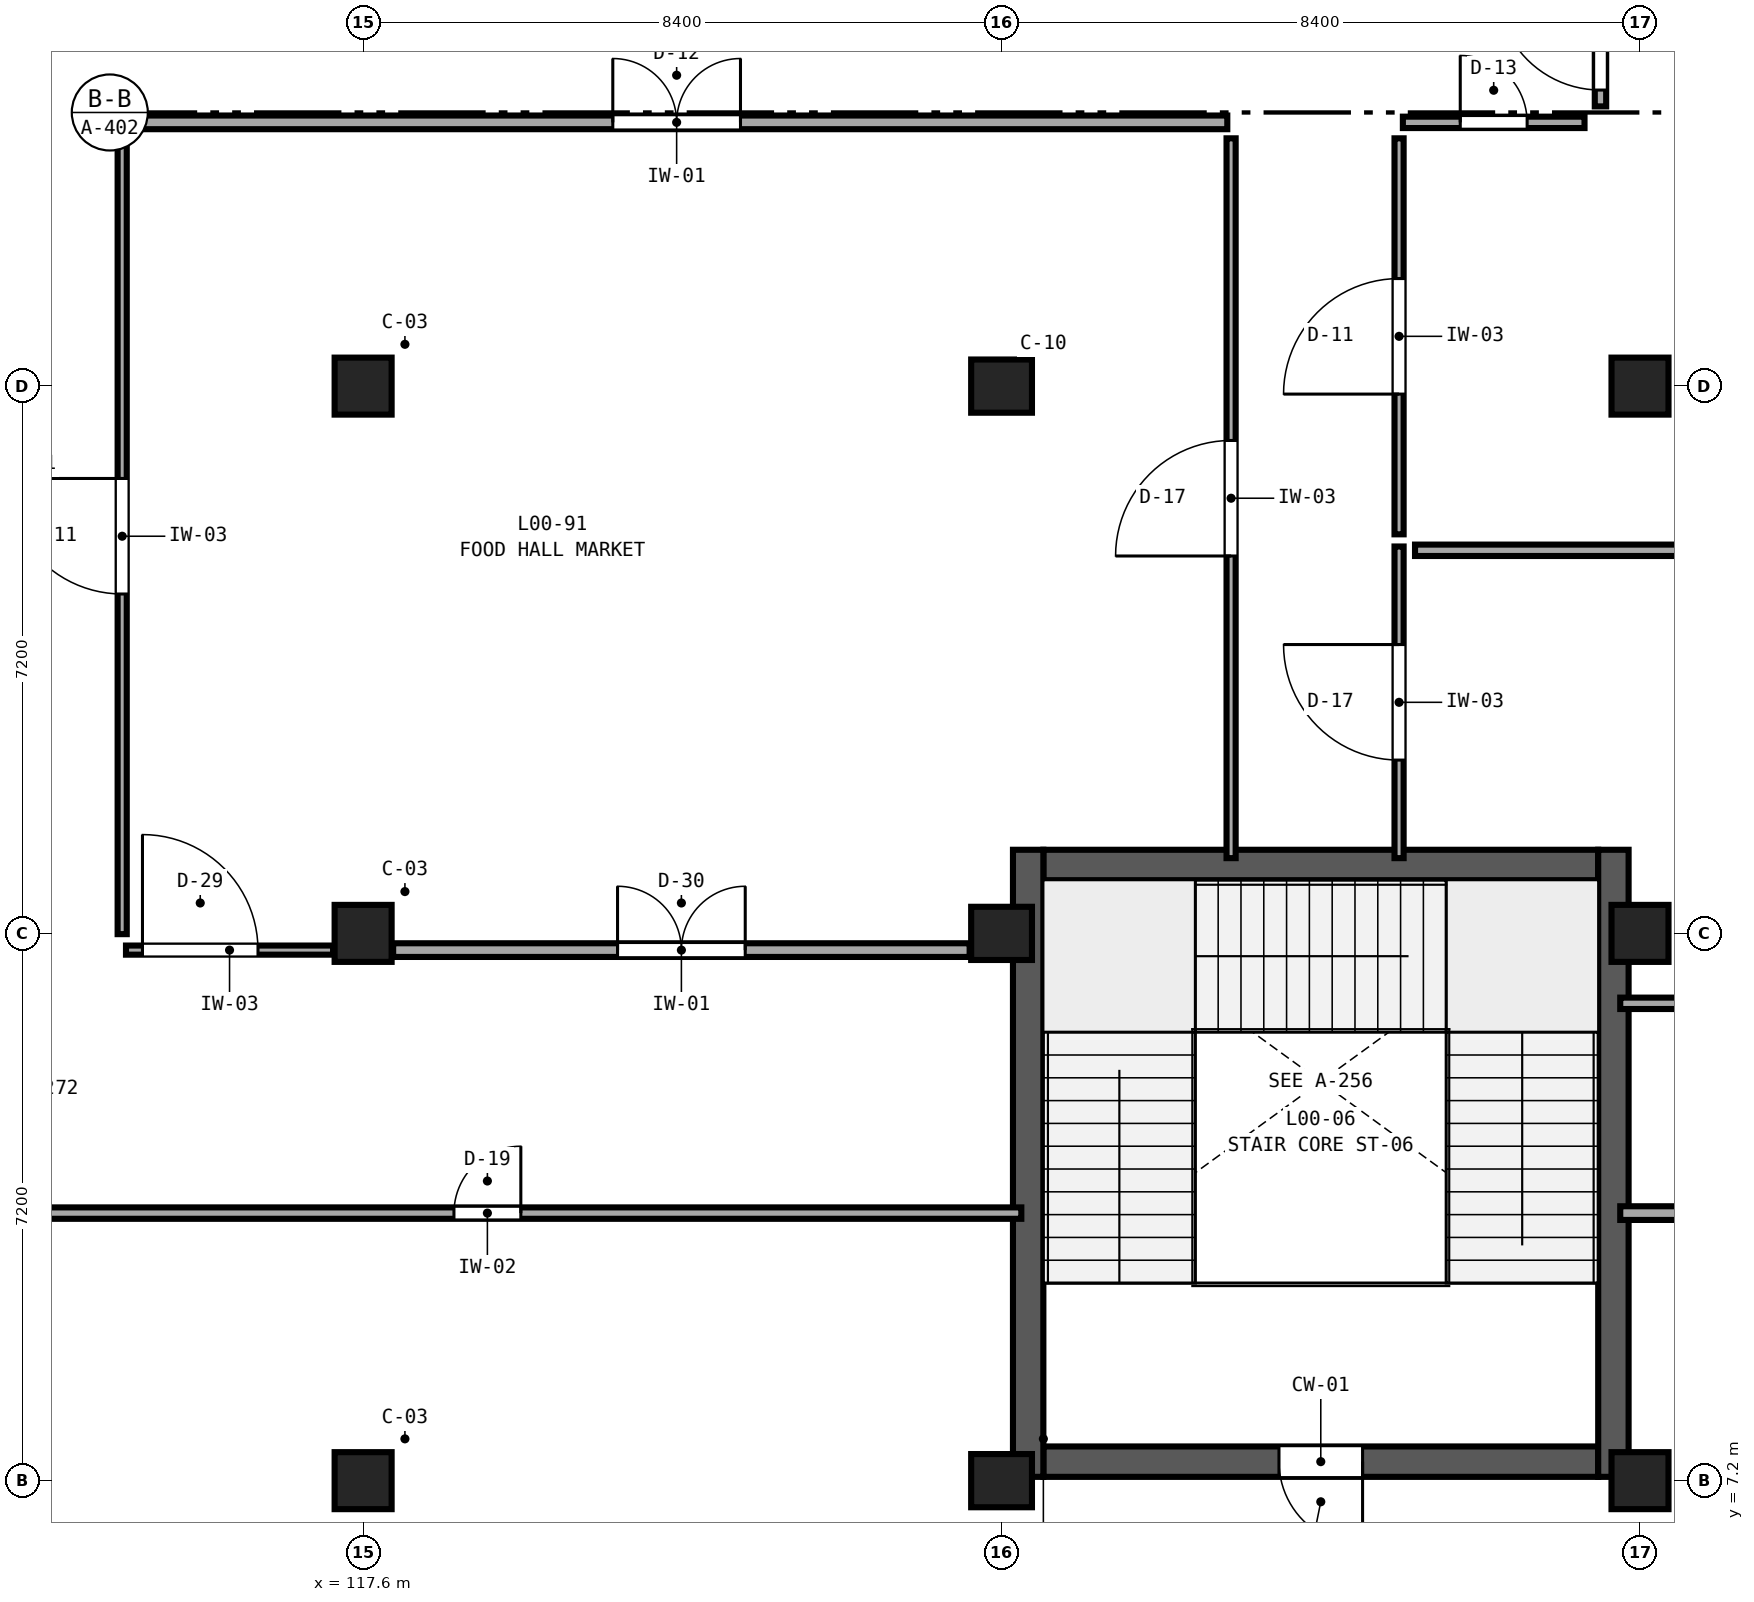
"""IFC4 building model, lengths in metres.
Left out: names, types, materials, properties, quantities, classifications, styles, units other than length and angle.
Written with IfcOpenShell. Run it as: python <this file> out.ifc"""

import sys

from ifc_helpers import new_model, si_unit, direction, frame, frame_2d, origin, origin_2d, place, context, subcontext, project, spatial, rectangle, extrude, element, fill, save


model = new_model("IFC4")
c1 = context("Model", 3, precision=1e-05, world=origin(), true_north=direction((0.0, 1.0)))
c2 = subcontext(c1, "Body", "Model", "MODEL_VIEW")
j1 = project(units=[si_unit("LENGTHUNIT", "METRE"), si_unit("PLANEANGLEUNIT", "RADIAN")], contexts=[c1])
p1 = place(None, origin())
s1 = spatial("IfcSite", under=j1, at=p1, CompositionType="ELEMENT")
p2 = place(p1, origin())
s2 = spatial("IfcBuilding", under=s1, at=p2, CompositionType="ELEMENT")
p3 = place(p2, origin())
s3 = spatial("IfcBuildingStorey", under=s2, at=p3, CompositionType="ELEMENT", Elevation=0.0)
for number, where, z_axis, x_axis in (
    (1, (117.6, 7.2, 0.0), (0.0, 0.0, 1.0), (1.0, 0.0, 0.0)),
    (2, (117.6, 14.4, 0.0), (0.0, 0.0, 1.0), (1.0, 0.0, 0.0)),
    (3, (117.6, 21.6, 0.0), (0.0, 0.0, 1.0), (1.0, 0.0, 0.0)),
):
    element("IfcColumn", number, at=place(p3, frame(where, z_axis=z_axis, x_axis=x_axis)), inside=s3, PredefinedType="COLUMN", context=c2, shape_type="SweptSolid", body=[
        extrude(rectangle(XDim=0.75, YDim=0.75, at=origin_2d()), origin(), (0.0, 0.0, 1.0), 5.4),
    ])
for number, where, z_axis, x_axis in (
    (4, (126.0, 7.2, 0.0), (0.0, 0.0, 1.0), (1.0, 0.0, 0.0)),
    (5, (126.0, 14.4, 0.0), (0.0, 0.0, 1.0), (1.0, 0.0, 0.0)),
    (6, (126.0, 21.6, 0.0), (0.0, 0.0, 1.0), (1.0, 0.0, 0.0)),
):
    element("IfcColumn", number, at=place(p3, frame(where, z_axis=z_axis, x_axis=x_axis)), inside=s3, PredefinedType="COLUMN", context=c2, shape_type="SweptSolid", body=[
        extrude(rectangle(XDim=0.8, YDim=0.7, at=origin_2d()), origin(), (0.0, 0.0, 1.0), 5.4),
    ])
for number, where, z_axis, x_axis in (
    (7, (134.4, 7.2, 0.0), (0.0, 0.0, 1.0), (1.0, 0.0, 0.0)),
    (8, (134.4, 14.4, 0.0), (0.0, 0.0, 1.0), (1.0, 0.0, 0.0)),
    (9, (134.4, 21.6, 0.0), (0.0, 0.0, 1.0), (1.0, 0.0, 0.0)),
):
    element("IfcColumn", number, at=place(p3, frame(where, z_axis=z_axis, x_axis=x_axis)), inside=s3, PredefinedType="COLUMN", context=c2, shape_type="SweptSolid", body=[
        extrude(rectangle(XDim=0.75, YDim=0.75, at=origin_2d()), origin(), (0.0, 0.0, 1.0), 5.4),
    ])
p4 = place(p3, frame((133.85, 7.45, 0.0), z_axis=(0.0, 0.0, 1.0), x_axis=(-1.0, 0.0, 0.0)))
e10 = element("IfcWall", 10, at=p4, inside=s3, PredefinedType="SHEAR", context=c2, shape_type="SweptSolid", body=[
    extrude(rectangle(XDim=7.3, YDim=0.4, at=frame_2d((3.65, 0.0))), origin(), (0.0, 0.0, 1.0), 5.4),
])
p5 = place(p4, frame((3.1, 0.0, 0.0)))
e11 = element("IfcOpeningElement", 11, at=p5, cuts=e10, PredefinedType="OPENING", context=c2, shape_type="SweptSolid", body=[
    extrude(rectangle(XDim=1.1, YDim=2.2, at=frame_2d((0.55, 1.1))), frame((0.0, 0.22, 0.0), z_axis=(0.0, -1.0, 0.0), x_axis=(1.0, 0.0, 0.0)), (0.0, 0.0, 1.0), 0.44),
])
p6 = place(p3, frame((126.55, 15.3, 0.0), z_axis=(0.0, 0.0, 1.0), x_axis=(1.0, 0.0, 0.0)))
e12 = element("IfcWall", 12, at=p6, inside=s3, PredefinedType="SHEAR", context=c2, shape_type="SweptSolid", body=[
    extrude(rectangle(XDim=7.3, YDim=0.4, at=frame_2d((3.65, 0.0))), origin(), (0.0, 0.0, 1.0), 5.4),
])
for number, where, z_axis, x_axis in (
    (13, (126.35, 15.5, 0.0), (0.0, 0.0, 1.0), (0.0, -1.0, 0.0)),
    (14, (134.05, 7.25, 0.0), (0.0, 0.0, 1.0), (0.0, 1.0, 0.0)),
):
    element("IfcWall", number, at=place(p3, frame(where, z_axis=z_axis, x_axis=x_axis)), inside=s3, PredefinedType="SHEAR", context=c2, shape_type="SweptSolid", body=[
        extrude(rectangle(XDim=8.25, YDim=0.4, at=frame_2d((4.125, 0.0))), origin(), (0.0, 0.0, 1.0), 5.4),
    ])
p7 = place(p3, frame((134.14, 10.72, 0.0), z_axis=(0.0, 0.0, 1.0), x_axis=(1.0, 0.0, 0.0)))
e15 = element("IfcWall", 15, at=p7, inside=s3, PredefinedType="PARTITIONING", context=c2, shape_type="SweptSolid", body=[
    extrude(rectangle(XDim=15.137, YDim=0.18, at=frame_2d((7.569, 0.0))), origin(), (0.0, 0.0, 1.0), 5.08),
])
p8 = place(p7, frame((6.729, 0.0, 0.0)))
e16 = element("IfcOpeningElement", 16, at=p8, cuts=e15, PredefinedType="OPENING", context=c2, shape_type="SweptSolid", body=[
    extrude(rectangle(XDim=1.68, YDim=2.45, at=frame_2d((0.84, 1.225))), frame((0.0, 0.11, 0.0), z_axis=(0.0, -1.0, 0.0), x_axis=(1.0, 0.0, 0.0)), (0.0, 0.0, 1.0), 0.22),
])
p9 = place(p3, frame((134.14, 13.48, 0.0), z_axis=(0.0, 0.0, 1.0), x_axis=(1.0, 0.0, 0.0)))
e17 = element("IfcWall", 17, at=p9, inside=s3, PredefinedType="PARTITIONING", context=c2, shape_type="SweptSolid", body=[
    extrude(rectangle(XDim=15.137, YDim=0.15, at=frame_2d((7.569, 0.0))), origin(), (0.0, 0.0, 1.0), 5.08),
])
p10 = place(p9, frame((5.988, 0.0, 0.0)))
e18 = element("IfcOpeningElement", 18, at=p10, cuts=e17, PredefinedType="OPENING", context=c2, shape_type="SweptSolid", body=[
    extrude(rectangle(XDim=0.88, YDim=2.05, at=frame_2d((0.44, 1.025))), frame((0.0, 0.095, 0.0), z_axis=(0.0, -1.0, 0.0), x_axis=(1.0, 0.0, 0.0)), (0.0, 0.0, 1.0), 0.19),
])
p11 = place(p3, frame((114.48, 25.07, 0.0), z_axis=(0.0, 0.0, 1.0), x_axis=(1.0, 0.0, 0.0)))
e19 = element("IfcWall", 19, at=p11, inside=s3, PredefinedType="PARTITIONING", context=c2, shape_type="SweptSolid", body=[
    extrude(rectangle(XDim=14.49, YDim=0.18, at=frame_2d((7.245, 0.0))), origin(), (0.0, 0.0, 1.0), 5.08),
])
p12 = place(p11, frame((6.405, 0.0, 0.0)))
e20 = element("IfcOpeningElement", 20, at=p12, cuts=e19, PredefinedType="OPENING", context=c2, shape_type="SweptSolid", body=[
    extrude(rectangle(XDim=1.68, YDim=2.13, at=frame_2d((0.84, 1.065))), frame((0.0, 0.11, 0.0), z_axis=(0.0, -1.0, 0.0), x_axis=(1.0, 0.0, 0.0)), (0.0, 0.0, 1.0), 0.22),
])
p13 = place(p3, frame((112.21, 10.72, 0.0), z_axis=(0.0, 0.0, 1.0), x_axis=(1.0, 0.0, 0.0)))
e21 = element("IfcWall", 21, at=p13, inside=s3, PredefinedType="PARTITIONING", context=c2, shape_type="SweptSolid", body=[
    extrude(rectangle(XDim=14.05, YDim=0.15, at=frame_2d((7.025, 0.0))), origin(), (0.0, 0.0, 1.0), 5.08),
])
p14 = place(p13, frame((6.585, 0.0, 0.0)))
e22 = element("IfcOpeningElement", 22, at=p14, cuts=e21, PredefinedType="OPENING", context=c2, shape_type="SweptSolid", body=[
    extrude(rectangle(XDim=0.88, YDim=2.29, at=frame_2d((0.44, 1.145))), frame((0.0, 0.095, 0.0), z_axis=(0.0, -1.0, 0.0), x_axis=(1.0, 0.0, 0.0)), (0.0, 0.0, 1.0), 0.19),
])
p15 = place(p3, frame((114.48, 14.18, 0.0), z_axis=(0.0, 0.0, 1.0), x_axis=(1.0, 0.0, 0.0)))
e23 = element("IfcWall", 23, at=p15, inside=s3, PredefinedType="PARTITIONING", context=c2, shape_type="SweptSolid", body=[
    extrude(rectangle(XDim=2.725, YDim=0.12, at=frame_2d((1.363, 0.0))), origin(), (0.0, 0.0, 1.0), 4.58),
])
p16 = place(p15, frame((0.217, 0.0, 0.0)))
e24 = element("IfcOpeningElement", 24, at=p16, cuts=e23, PredefinedType="OPENING", context=c2, shape_type="SweptSolid", body=[
    extrude(rectangle(XDim=1.52, YDim=2.37, at=frame_2d((0.76, 1.185))), frame((0.0, 0.08, 0.0), z_axis=(0.0, -1.0, 0.0), x_axis=(1.0, 0.0, 0.0)), (0.0, 0.0, 1.0), 0.16),
])
p17 = place(p3, frame((117.995, 14.18, 0.0), z_axis=(0.0, 0.0, 1.0), x_axis=(1.0, 0.0, 0.0)))
e25 = element("IfcWall", 25, at=p17, inside=s3, PredefinedType="PARTITIONING", context=c2, shape_type="SweptSolid", body=[
    extrude(rectangle(XDim=7.585, YDim=0.18, at=frame_2d((3.792, 0.0))), origin(), (0.0, 0.0, 1.0), 4.58),
])
p18 = place(p17, frame((2.952, 0.0, 0.0)))
e26 = element("IfcOpeningElement", 26, at=p18, cuts=e25, PredefinedType="OPENING", context=c2, shape_type="SweptSolid", body=[
    extrude(rectangle(XDim=1.68, YDim=2.37, at=frame_2d((0.84, 1.185))), frame((0.0, 0.11, 0.0), z_axis=(0.0, -1.0, 0.0), x_axis=(1.0, 0.0, 0.0)), (0.0, 0.0, 1.0), 0.22),
])
p19 = place(p3, frame((114.43, 14.39, 0.0), z_axis=(0.0, 0.0, 1.0), x_axis=(0.0, 1.0, 0.0)))
e27 = element("IfcWall", 27, at=p19, inside=s3, PredefinedType="PARTITIONING", context=c2, shape_type="SweptSolid", body=[
    extrude(rectangle(XDim=10.47, YDim=0.12, at=frame_2d((5.235, 0.0))), origin(), (0.0, 0.0, 1.0), 5.08),
])
p20 = place(p19, frame((4.475, 0.0, 0.0)))
e28 = element("IfcOpeningElement", 28, at=p20, cuts=e27, PredefinedType="OPENING", context=c2, shape_type="SweptSolid", body=[
    extrude(rectangle(XDim=1.52, YDim=2.13, at=frame_2d((0.76, 1.065))), frame((0.0, 0.08, 0.0), z_axis=(0.0, -1.0, 0.0), x_axis=(1.0, 0.0, 0.0)), (0.0, 0.0, 1.0), 0.16),
])
p21 = place(p3, frame((129.02, 15.39, 0.0), z_axis=(0.0, 0.0, 1.0), x_axis=(0.0, 1.0, 0.0)))
e29 = element("IfcWall", 29, at=p21, inside=s3, PredefinedType="PARTITIONING", context=c2, shape_type="SweptSolid", body=[
    extrude(rectangle(XDim=9.47, YDim=0.12, at=frame_2d((4.735, 0.0))), origin(), (0.0, 0.0, 1.0), 5.08),
])
p22 = place(p21, frame((3.975, 0.0, 0.0)))
e30 = element("IfcOpeningElement", 30, at=p22, cuts=e29, PredefinedType="OPENING", context=c2, shape_type="SweptSolid", body=[
    extrude(rectangle(XDim=1.52, YDim=2.21, at=frame_2d((0.76, 1.105))), frame((0.0, 0.08, 0.0), z_axis=(0.0, -1.0, 0.0), x_axis=(1.0, 0.0, 0.0)), (0.0, 0.0, 1.0), 0.16),
])
p23 = place(p3, frame((131.23, 19.65, 0.0), z_axis=(0.0, 0.0, 1.0), x_axis=(0.0, 1.0, 0.0)))
e31 = element("IfcWall", 31, at=p23, inside=s3, PredefinedType="PARTITIONING", context=c2, shape_type="SweptSolid", body=[
    extrude(rectangle(XDim=5.21, YDim=0.12, at=frame_2d((2.605, 0.0))), origin(), (0.0, 0.0, 1.0), 5.08),
])
p24 = place(p23, frame((1.845, 0.0, 0.0)))
e32 = element("IfcOpeningElement", 32, at=p24, cuts=e31, PredefinedType="OPENING", context=c2, shape_type="SweptSolid", body=[
    extrude(rectangle(XDim=1.52, YDim=2.13, at=frame_2d((0.76, 1.065))), frame((0.0, 0.08, 0.0), z_axis=(0.0, -1.0, 0.0), x_axis=(1.0, 0.0, 0.0)), (0.0, 0.0, 1.0), 0.16),
])
p25 = place(p3, frame((131.23, 15.39, 0.0), z_axis=(0.0, 0.0, 1.0), x_axis=(0.0, 1.0, 0.0)))
e33 = element("IfcWall", 33, at=p25, inside=s3, PredefinedType="PARTITIONING", context=c2, shape_type="SweptSolid", body=[
    extrude(rectangle(XDim=4.1, YDim=0.12, at=frame_2d((2.05, 0.0))), origin(), (0.0, 0.0, 1.0), 5.08),
])
p26 = place(p25, frame((1.29, 0.0, 0.0)))
e34 = element("IfcOpeningElement", 34, at=p26, cuts=e33, PredefinedType="OPENING", context=c2, shape_type="SweptSolid", body=[
    extrude(rectangle(XDim=1.52, YDim=2.21, at=frame_2d((0.76, 1.105))), frame((0.0, 0.08, 0.0), z_axis=(0.0, -1.0, 0.0), x_axis=(1.0, 0.0, 0.0)), (0.0, 0.0, 1.0), 0.16),
])
p27 = place(p3, frame((131.28, 25.07, 0.0), z_axis=(0.0, 0.0, 1.0), x_axis=(1.0, 0.0, 0.0)))
e35 = element("IfcWall", 35, at=p27, inside=s3, PredefinedType="PARTITIONING", context=c2, shape_type="SweptSolid", body=[
    extrude(rectangle(XDim=2.39, YDim=0.15, at=frame_2d((1.195, 0.0))), origin(), (0.0, 0.0, 1.0), 5.08),
])
p28 = place(p27, frame((0.755, 0.0, 0.0)))
e36 = element("IfcOpeningElement", 36, at=p28, cuts=e35, PredefinedType="OPENING", context=c2, shape_type="SweptSolid", body=[
    extrude(rectangle(XDim=0.88, YDim=2.21, at=frame_2d((0.44, 1.105))), frame((0.0, 0.095, 0.0), z_axis=(0.0, -1.0, 0.0), x_axis=(1.0, 0.0, 0.0)), (0.0, 0.0, 1.0), 0.19),
])
p29 = place(p3, frame((133.88, 25.28, 0.0), z_axis=(0.0, 0.0, 1.0), x_axis=(0.0, 1.0, 0.0)))
e37 = element("IfcWall", 37, at=p29, inside=s3, PredefinedType="PARTITIONING", context=c2, shape_type="SweptSolid", body=[
    extrude(rectangle(XDim=1.79, YDim=0.15, at=frame_2d((0.895, 0.0))), origin(), (0.0, 0.0, 1.0), 4.58),
])
p30 = place(p29, frame((0.215, 0.0, 0.0)))
e38 = element("IfcOpeningElement", 38, at=p30, cuts=e37, PredefinedType="OPENING", context=c2, shape_type="SweptSolid", body=[
    extrude(rectangle(XDim=1.36, YDim=2.13, at=frame_2d((0.68, 1.065))), frame((0.0, 0.095, 0.0), z_axis=(0.0, -1.0, 0.0), x_axis=(1.0, 0.0, 0.0)), (0.0, 0.0, 1.0), 0.19),
])
p31 = place(p3, frame((131.44, 19.44, 0.0), z_axis=(0.0, 0.0, 1.0), x_axis=(1.0, 0.0, 0.0)))
e39 = element("IfcWall", 39, at=p31, inside=s3, PredefinedType="PARTITIONING", context=c2, shape_type="SweptSolid", body=[
    extrude(rectangle(XDim=17.577, YDim=0.15, at=frame_2d((8.789, 0.0))), origin(), (0.0, 0.0, 1.0), 5.08),
])
p32 = place(p5, origin())
e40 = element("IfcDoor", 40, at=p32, inside=s3, OperationType="SINGLE_SWING_LEFT", PredefinedType="DOOR", context=c2, shape_type="SweptSolid", body=[
    extrude(rectangle(XDim=1.1, YDim=2.2, at=frame_2d((0.55, 1.1))), frame((0.0, 0.025, 0.0), z_axis=(0.0, -1.0, 0.0), x_axis=(1.0, 0.0, 0.0)), (0.0, 0.0, 1.0), 0.05),
])
fill(e11, e40)
p33 = place(p12, frame((1.68, 0.0, 0.0), z_axis=(0.0, 0.0, 1.0), x_axis=(-1.0, 0.0, 0.0)))
e41 = element("IfcDoor", 41, at=p33, inside=s3, OperationType="DOUBLE_DOOR_SINGLE_SWING", PredefinedType="DOOR", context=c2, shape_type="SweptSolid", body=[
    extrude(rectangle(XDim=1.68, YDim=2.13, at=frame_2d((0.84, 1.065))), frame((0.0, 0.025, 0.0), z_axis=(0.0, -1.0, 0.0), x_axis=(1.0, 0.0, 0.0)), (0.0, 0.0, 1.0), 0.05),
])
fill(e20, e41)
p34 = place(p14, frame((0.88, 0.0, 0.0), z_axis=(0.0, 0.0, 1.0), x_axis=(-1.0, 0.0, 0.0)))
e42 = element("IfcDoor", 42, at=p34, inside=s3, OperationType="SINGLE_SWING_RIGHT", PredefinedType="DOOR", context=c2, shape_type="SweptSolid", body=[
    extrude(rectangle(XDim=0.88, YDim=2.29, at=frame_2d((0.44, 1.145))), frame((0.0, 0.025, 0.0), z_axis=(0.0, -1.0, 0.0), x_axis=(1.0, 0.0, 0.0)), (0.0, 0.0, 1.0), 0.05),
])
fill(e22, e42)
p35 = place(p16, origin())
e43 = element("IfcDoor", 43, at=p35, inside=s3, OperationType="SINGLE_SWING_LEFT", PredefinedType="DOOR", context=c2, shape_type="SweptSolid", body=[
    extrude(rectangle(XDim=1.52, YDim=2.37, at=frame_2d((0.76, 1.185))), frame((0.0, 0.025, 0.0), z_axis=(0.0, -1.0, 0.0), x_axis=(1.0, 0.0, 0.0)), (0.0, 0.0, 1.0), 0.05),
])
fill(e24, e43)
p36 = place(p18, origin())
e44 = element("IfcDoor", 44, at=p36, inside=s3, OperationType="DOUBLE_DOOR_SINGLE_SWING", PredefinedType="DOOR", context=c2, shape_type="SweptSolid", body=[
    extrude(rectangle(XDim=1.68, YDim=2.37, at=frame_2d((0.84, 1.185))), frame((0.0, 0.025, 0.0), z_axis=(0.0, -1.0, 0.0), x_axis=(1.0, 0.0, 0.0)), (0.0, 0.0, 1.0), 0.05),
])
fill(e26, e44)
p37 = place(p20, frame((1.52, 0.0, 0.0), z_axis=(0.0, 0.0, 1.0), x_axis=(-1.0, 0.0, 0.0)))
e45 = element("IfcDoor", 45, at=p37, inside=s3, OperationType="SINGLE_SWING_RIGHT", PredefinedType="DOOR", context=c2, shape_type="SweptSolid", body=[
    extrude(rectangle(XDim=1.52, YDim=2.13, at=frame_2d((0.76, 1.065))), frame((0.0, 0.025, 0.0), z_axis=(0.0, -1.0, 0.0), x_axis=(1.0, 0.0, 0.0)), (0.0, 0.0, 1.0), 0.05),
])
fill(e28, e45)
p38 = place(p22, origin())
e46 = element("IfcDoor", 46, at=p38, inside=s3, OperationType="SINGLE_SWING_LEFT", PredefinedType="DOOR", context=c2, shape_type="SweptSolid", body=[
    extrude(rectangle(XDim=1.52, YDim=2.21, at=frame_2d((0.76, 1.105))), frame((0.0, 0.025, 0.0), z_axis=(0.0, -1.0, 0.0), x_axis=(1.0, 0.0, 0.0)), (0.0, 0.0, 1.0), 0.05),
])
fill(e30, e46)
p39 = place(p24, frame((1.52, 0.0, 0.0), z_axis=(0.0, 0.0, 1.0), x_axis=(-1.0, 0.0, 0.0)))
e47 = element("IfcDoor", 47, at=p39, inside=s3, OperationType="SINGLE_SWING_LEFT", PredefinedType="DOOR", context=c2, shape_type="SweptSolid", body=[
    extrude(rectangle(XDim=1.52, YDim=2.13, at=frame_2d((0.76, 1.065))), frame((0.0, 0.025, 0.0), z_axis=(0.0, -1.0, 0.0), x_axis=(1.0, 0.0, 0.0)), (0.0, 0.0, 1.0), 0.05),
])
fill(e32, e47)
p40 = place(p26, frame((1.52, 0.0, 0.0), z_axis=(0.0, 0.0, 1.0), x_axis=(-1.0, 0.0, 0.0)))
e48 = element("IfcDoor", 48, at=p40, inside=s3, OperationType="SINGLE_SWING_RIGHT", PredefinedType="DOOR", context=c2, shape_type="SweptSolid", body=[
    extrude(rectangle(XDim=1.52, YDim=2.21, at=frame_2d((0.76, 1.105))), frame((0.0, 0.025, 0.0), z_axis=(0.0, -1.0, 0.0), x_axis=(1.0, 0.0, 0.0)), (0.0, 0.0, 1.0), 0.05),
])
fill(e34, e48)
p41 = place(p28, frame((0.88, 0.0, 0.0), z_axis=(0.0, 0.0, 1.0), x_axis=(-1.0, 0.0, 0.0)))
e49 = element("IfcDoor", 49, at=p41, inside=s3, OperationType="SINGLE_SWING_LEFT", PredefinedType="DOOR", context=c2, shape_type="SweptSolid", body=[
    extrude(rectangle(XDim=0.88, YDim=2.21, at=frame_2d((0.44, 1.105))), frame((0.0, 0.025, 0.0), z_axis=(0.0, -1.0, 0.0), x_axis=(1.0, 0.0, 0.0)), (0.0, 0.0, 1.0), 0.05),
])
fill(e36, e49)
p42 = place(p30, frame((1.36, 0.0, 0.0), z_axis=(0.0, 0.0, 1.0), x_axis=(-1.0, 0.0, 0.0)))
e50 = element("IfcDoor", 50, at=p42, inside=s3, OperationType="SINGLE_SWING_RIGHT", PredefinedType="DOOR", context=c2, shape_type="SweptSolid", body=[
    extrude(rectangle(XDim=1.36, YDim=2.13, at=frame_2d((0.68, 1.065))), frame((0.0, 0.025, 0.0), z_axis=(0.0, -1.0, 0.0), x_axis=(1.0, 0.0, 0.0)), (0.0, 0.0, 1.0), 0.05),
])
fill(e38, e50)
save(model, sys.argv[1])
